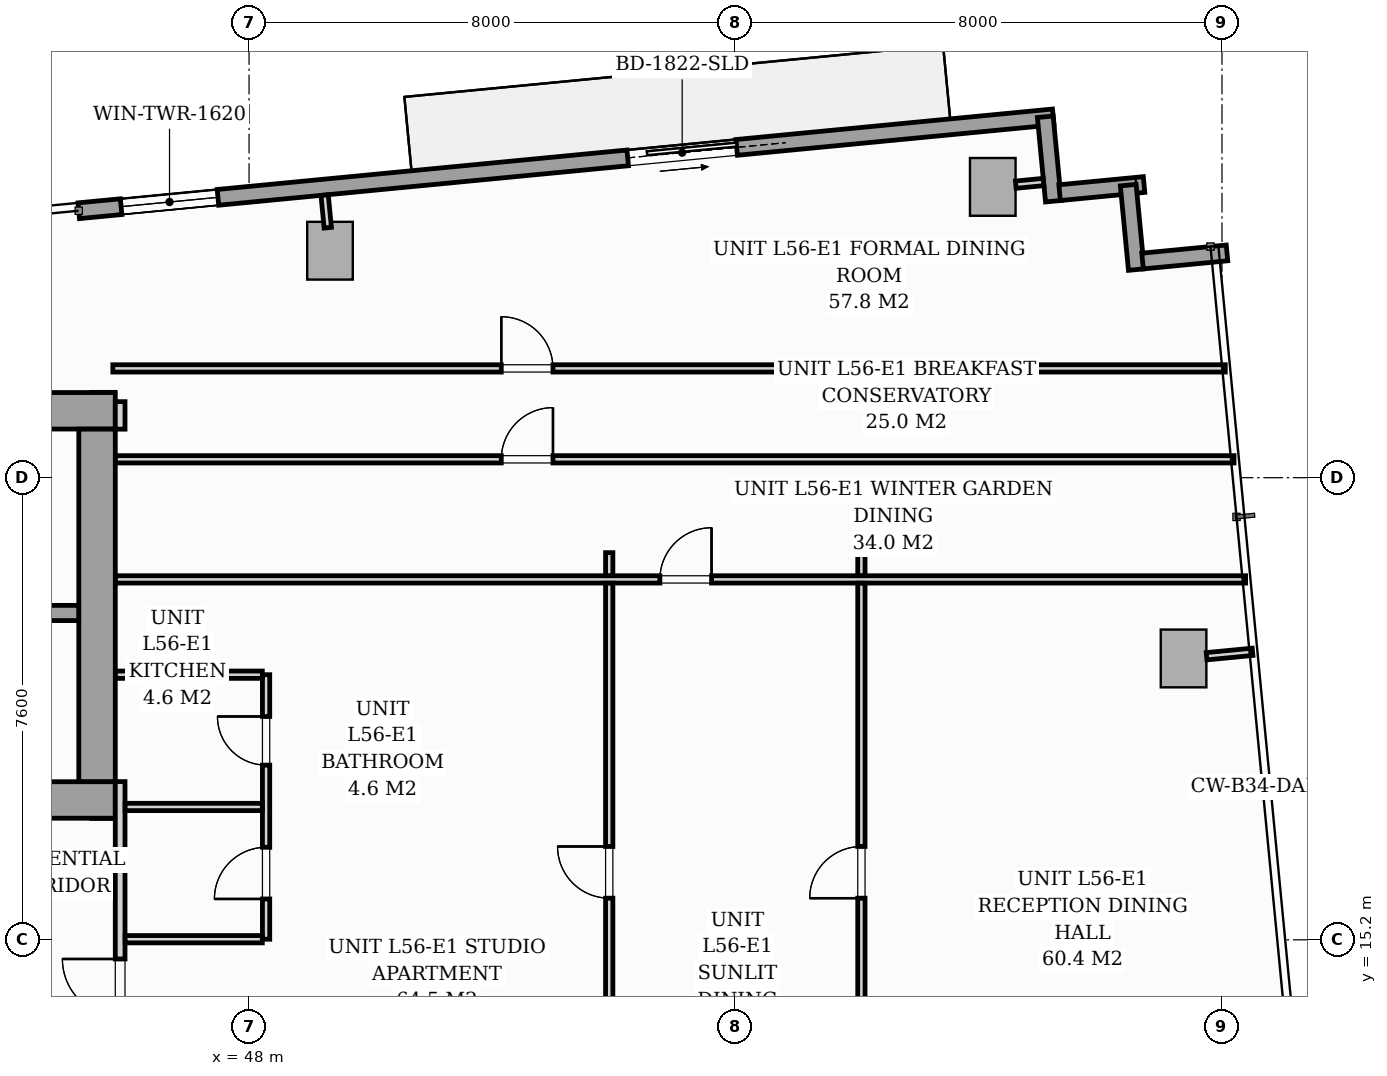
"""IFC4 building model, lengths in metres.
Left out: names, types, materials, properties, quantities, classifications, styles, units other than length and angle.
Written with IfcOpenShell. Run it as: python <this file> out.ifc"""

import sys

from ifc_helpers import new_model, si_unit, direction, frame, frame_2d, origin, origin_2d, place, context, subcontext, project, spatial, rectangle, i_section, extrude, source, transform, mapped, element, fill, save


model = new_model("IFC4")
c1 = context("Model", 3, precision=1e-05, world=origin(), true_north=direction((0.0, 1.0)))
c2 = subcontext(c1, "Body", "Model", "MODEL_VIEW")
j1 = project(units=[si_unit("LENGTHUNIT", "METRE"), si_unit("PLANEANGLEUNIT", "RADIAN")], contexts=[c1])
p1 = place(None, origin())
s1 = spatial("IfcSite", under=j1, at=p1, CompositionType="ELEMENT")
p2 = place(p1, origin())
s2 = spatial("IfcBuilding", under=s1, at=p2, CompositionType="ELEMENT")
p3 = place(p2, frame((0.0, 0.0, 195.4)))
s3 = spatial("IfcBuildingStorey", under=s2, at=p3, CompositionType="ELEMENT", Elevation=195.4)
m1 = source(origin(), c2, "Body", "SweptSolid", [
    extrude(i_section(OverallWidth=0.416, OverallDepth=0.446, WebThickness=0.039, FlangeThickness=0.063, FilletRadius=0.018, at=origin_2d()), origin(), (0.0, 0.0, 1.0), 3.196),
])
for number, where, z_axis, x_axis in (
    (1, (45.6, 17.4, 0.002), (0.0, 0.0, 1.0), (1.0, 0.0, 0.0)),
    (2, (45.6, 24.0, 0.002), (0.0, 0.0, 1.0), (1.0, 0.0, 0.0)),
):
    element("IfcColumn", number, at=place(p3, frame(where, z_axis=z_axis, x_axis=x_axis)), inside=s3, PredefinedType="PILASTER", context=c2, shape_type="MappedRepresentation", body=[
        mapped(m1, transform((0.0, 0.0, 0.0), scale=1.0)),
    ])
m2 = source(origin(), c2, "Body", "SweptSolid", [
    extrude(rectangle(XDim=0.75, YDim=0.95, at=origin_2d()), origin(), (0.0, 0.0, 1.0), 3.196),
])
for number, where, z_axis, x_axis in (
    (3, (49.331, 26.533, 0.002), (0.0, 0.0, 1.0), (0.995, 0.096, 0.0)),
    (4, (60.23, 27.582, 0.002), (0.0, 0.0, 1.0), (0.995, 0.096, 0.0)),
    (5, (63.368, 19.827, 0.002), (0.0, 0.0, 1.0), (0.995, 0.096, 0.0)),
):
    element("IfcColumn", number, at=place(p3, frame(where, z_axis=z_axis, x_axis=x_axis)), inside=s3, PredefinedType="COLUMN", context=c2, shape_type="MappedRepresentation", body=[
        mapped(m2, transform((0.0, 0.0, 0.0), scale=1.0)),
    ])
p4 = place(p3, frame((45.199, 27.19, 0.0), z_axis=(0.0, 0.0, 1.0), x_axis=(0.995397074604, 0.095836652014, 0.0)))
e6 = element("IfcWall", 6, at=p4, inside=s3, PredefinedType="STANDARD", context=c2, shape_type="SweptSolid", body=[
    extrude(rectangle(XDim=16.1, YDim=0.26, at=frame_2d((8.05, 0.0))), origin(), (0.0, 0.0, 1.0), 2.94),
])
p5 = place(p4, frame((9.07, 0.0, 0.0)))
e7 = element("IfcOpeningElement", 7, at=p5, cuts=e6, PredefinedType="OPENING", context=c2, shape_type="SweptSolid", body=[
    extrude(rectangle(XDim=1.8, YDim=2.06, at=frame_2d((0.9, 1.03))), frame((0.0, 0.14, 0.0), z_axis=(0.0, -1.0, 0.0), x_axis=(1.0, 0.0, 0.0)), (0.0, 0.0, 1.0), 0.28),
])
p6 = place(p4, frame((0.7, 0.0, 0.65)))
e8 = element("IfcOpeningElement", 8, at=p6, cuts=e6, PredefinedType="OPENING", context=c2, shape_type="SweptSolid", body=[
    extrude(rectangle(XDim=1.6, YDim=1.5, at=frame_2d((0.8, 0.75))), frame((0.0, 0.14, 0.0), z_axis=(0.0, -1.0, 0.0), x_axis=(1.0, 0.0, 0.0)), (0.0, 0.0, 1.0), 0.28),
])
p7 = place(p3, frame((61.094, 28.735, 0.0), z_axis=(0.0, 0.0, 1.0), x_axis=(0.095742423056, -0.99540614245, 0.0)))
e9 = element("IfcWall", 9, at=p7, inside=s3, PredefinedType="STANDARD", context=c2, shape_type="SweptSolid", body=[
    extrude(rectangle(XDim=1.395, YDim=0.26, at=frame_2d((0.697, 0.0))), origin(), (0.0, 0.0, 1.0), 2.94),
])
p8 = place(p3, frame((61.33, 27.487, 0.0), z_axis=(0.0, 0.0, 1.0), x_axis=(0.995391056452, 0.09589913835, 0.0)))
e10 = element("IfcWall", 10, at=p8, inside=s3, PredefinedType="STANDARD", context=c2, shape_type="SweptSolid", body=[
    extrude(rectangle(XDim=1.395, YDim=0.26, at=frame_2d((0.698, 0.0))), origin(), (0.0, 0.0, 1.0), 2.94),
])
for number, where, z_axis, x_axis in (
    (11, (62.458, 27.611, 0.0), (0.0, 0.0, 1.0), (0.096, -0.995, 0.0)),
    (12, (62.694, 26.363, 0.0), (0.0, 0.0, 1.0), (0.995, 0.096, 0.0)),
):
    element("IfcWall", number, at=place(p3, frame(where, z_axis=z_axis, x_axis=x_axis)), inside=s3, PredefinedType="STANDARD", context=c2, shape_type="SweptSolid", body=[
        extrude(rectangle(XDim=1.395, YDim=0.26, at=frame_2d((0.697, 0.0))), origin(), (0.0, 0.0, 1.0), 2.94),
    ])
p9 = place(p3, frame((26.2, 17.5, 0.0), z_axis=(0.0, 0.0, 1.0), x_axis=(1.0, 0.0, 0.0)))
e13 = element("IfcWall", 13, at=p9, inside=s3, PredefinedType="SHEAR", context=c2, shape_type="SweptSolid", body=[
    extrude(rectangle(XDim=19.6, YDim=0.6, at=frame_2d((9.8, 0.0))), origin(), (0.0, 0.0, 1.0), 3.2),
])
p10 = place(p9, frame((0.95, 0.0, 0.0)))
e14 = element("IfcOpeningElement", 14, at=p10, cuts=e13, PredefinedType="OPENING", context=c2, shape_type="SweptSolid", body=[
    extrude(rectangle(XDim=0.95, YDim=2.06, at=frame_2d((0.475, 1.03))), frame((0.0, 0.31, 0.0), z_axis=(0.0, -1.0, 0.0), x_axis=(1.0, 0.0, 0.0)), (0.0, 0.0, 1.0), 0.62),
])
p11 = place(p9, frame((9.38, 0.0, 0.0)))
e15 = element("IfcOpeningElement", 15, at=p11, cuts=e13, PredefinedType="OPENING", context=c2, shape_type="SweptSolid", body=[
    extrude(rectangle(XDim=0.85, YDim=2.0, at=frame_2d((0.425, 1.0))), frame((0.0, 0.31, 0.0), z_axis=(0.0, -1.0, 0.0), x_axis=(1.0, 0.0, 0.0)), (0.0, 0.0, 1.0), 0.62),
])
p12 = place(p9, frame((17.55, 0.0, 0.0)))
e16 = element("IfcOpeningElement", 16, at=p12, cuts=e13, PredefinedType="OPENING", context=c2, shape_type="SweptSolid", body=[
    extrude(rectangle(XDim=0.95, YDim=2.06, at=frame_2d((0.475, 1.03))), frame((0.0, 0.31, 0.0), z_axis=(0.0, -1.0, 0.0), x_axis=(1.0, 0.0, 0.0)), (0.0, 0.0, 1.0), 0.62),
])
p13 = place(p3, frame((26.2, 23.9, 0.0), z_axis=(0.0, 0.0, 1.0), x_axis=(1.0, 0.0, 0.0)))
e17 = element("IfcWall", 17, at=p13, inside=s3, PredefinedType="SHEAR", context=c2, shape_type="SweptSolid", body=[
    extrude(rectangle(XDim=19.6, YDim=0.6, at=frame_2d((9.8, 0.0))), origin(), (0.0, 0.0, 1.0), 3.2),
])
p14 = place(p3, frame((45.5, 17.802, 0.0), z_axis=(0.0, 0.0, 1.0), x_axis=(0.0, 1.0, 0.0)))
e18 = element("IfcWall", 18, at=p14, inside=s3, PredefinedType="SHEAR", context=c2, shape_type="SweptSolid", body=[
    extrude(rectangle(XDim=5.796, YDim=0.6, at=frame_2d((2.898, 0.0))), origin(), (0.0, 0.0, 1.0), 3.2),
])
p15 = place(p3, frame((37.05, 20.575, 0.0), z_axis=(0.0, 0.0, 1.0), x_axis=(1.0, 0.0, 0.0)))
e19 = element("IfcWall", 19, at=p15, inside=s3, PredefinedType="SOLIDWALL", context=c2, shape_type="SweptSolid", body=[
    extrude(rectangle(XDim=8.148, YDim=0.25, at=frame_2d((4.074, 0.0))), origin(), (0.0, 0.0, 1.0), 3.2),
])
p16 = place(p15, frame((6.6, 0.0, 0.0)))
e20 = element("IfcOpeningElement", 20, at=p16, cuts=e19, PredefinedType="OPENING", context=c2, shape_type="SweptSolid", body=[
    extrude(rectangle(XDim=0.95, YDim=2.06, at=frame_2d((0.475, 1.03))), frame((0.0, 0.135, 0.0), z_axis=(0.0, -1.0, 0.0), x_axis=(1.0, 0.0, 0.0)), (0.0, 0.0, 1.0), 0.27),
])
p17 = place(p3, frame((45.88, 13.442, 0.0), z_axis=(0.0, 0.0, 1.0), x_axis=(0.0, 1.0, 0.0)))
e21 = element("IfcWall", 21, at=p17, inside=s3, PredefinedType="PARTITIONING", context=c2, shape_type="SweptSolid", body=[
    extrude(rectangle(XDim=4.36, YDim=0.16, at=frame_2d((2.18, 0.0))), origin(), (0.0, 0.0, 1.0), 2.94),
])
p18 = place(p17, frame((0.493, 0.0, 0.0)))
e22 = element("IfcOpeningElement", 22, at=p18, cuts=e21, PredefinedType="OPENING", context=c2, shape_type="SweptSolid", body=[
    extrude(rectangle(XDim=0.95, YDim=2.06, at=frame_2d((0.475, 1.03))), frame((0.0, 0.09, 0.0), z_axis=(0.0, -1.0, 0.0), x_axis=(1.0, 0.0, 0.0)), (0.0, 0.0, 1.0), 0.18),
])
p19 = place(p3, frame((45.88, 23.598, 0.0), z_axis=(0.0, 0.0, 1.0), x_axis=(0.0, 1.0, 0.0)))
e23 = element("IfcWall", 23, at=p19, inside=s3, PredefinedType="PARTITIONING", context=c2, shape_type="SweptSolid", body=[
    extrude(rectangle(XDim=0.452, YDim=0.16, at=frame_2d((0.226, 0.0))), origin(), (0.0, 0.0, 1.0), 2.94),
])
p20 = place(p3, frame((48.28, 15.21, 0.0), z_axis=(0.0, 0.0, 1.0), x_axis=(0.0, 1.0, 0.0)))
e24 = element("IfcWall", 24, at=p20, inside=s3, PredefinedType="PARTITIONING", context=c2, shape_type="SweptSolid", body=[
    extrude(rectangle(XDim=4.35, YDim=0.12, at=frame_2d((2.175, 0.0))), origin(), (0.0, 0.0, 1.0), 2.94),
])
p21 = place(p20, frame((0.662, 0.0, 0.0)))
e25 = element("IfcOpeningElement", 25, at=p21, cuts=e24, PredefinedType="OPENING", context=c2, shape_type="SweptSolid", body=[
    extrude(rectangle(XDim=0.85, YDim=2.05, at=frame_2d((0.425, 1.025))), frame((0.0, 0.07, 0.0), z_axis=(0.0, -1.0, 0.0), x_axis=(1.0, 0.0, 0.0)), (0.0, 0.0, 1.0), 0.14),
])
p22 = place(p20, frame((2.863, 0.0, 0.0)))
e26 = element("IfcOpeningElement", 26, at=p22, cuts=e24, PredefinedType="OPENING", context=c2, shape_type="SweptSolid", body=[
    extrude(rectangle(XDim=0.8, YDim=2.02, at=frame_2d((0.4, 1.01))), frame((0.0, 0.07, 0.0), z_axis=(0.0, -1.0, 0.0), x_axis=(1.0, 0.0, 0.0)), (0.0, 0.0, 1.0), 0.14),
])
p23 = place(p3, frame((45.962, 17.385, 0.0), z_axis=(0.0, 0.0, 1.0), x_axis=(1.0, 0.0, 0.0)))
e27 = element("IfcWall", 27, at=p23, inside=s3, PredefinedType="PARTITIONING", context=c2, shape_type="SweptSolid", body=[
    extrude(rectangle(XDim=2.256, YDim=0.12, at=frame_2d((1.128, 0.0))), origin(), (0.0, 0.0, 1.0), 2.281),
])
p24 = place(p3, frame((45.962, 15.21, 0.0), z_axis=(0.0, 0.0, 1.0), x_axis=(1.0, 0.0, 0.0)))
e28 = element("IfcWall", 28, at=p24, inside=s3, PredefinedType="PARTITIONING", context=c2, shape_type="SweptSolid", body=[
    extrude(rectangle(XDim=2.256, YDim=0.12, at=frame_2d((1.128, 0.0))), origin(), (0.0, 0.0, 1.0), 2.94),
])
p25 = place(p3, frame((45.802, 19.56, 0.0), z_axis=(0.0, 0.0, 1.0), x_axis=(1.0, 0.0, 0.0)))
e29 = element("IfcWall", 29, at=p25, inside=s3, PredefinedType="PARTITIONING", context=c2, shape_type="SweptSolid", body=[
    extrude(rectangle(XDim=2.416, YDim=0.12, at=frame_2d((1.208, 0.0))), origin(), (0.0, 0.0, 1.0), 2.94),
])
p26 = place(p3, frame((45.76, 24.597, 0.0), z_axis=(0.0, 0.0, 1.0), x_axis=(1.0, 0.0, 0.0)))
e30 = element("IfcWall", 30, at=p26, inside=s3, PredefinedType="PARTITIONING", context=c2, shape_type="SweptSolid", body=[
    extrude(rectangle(XDim=18.294, YDim=0.12, at=frame_2d((9.147, 0.0))), origin(), (0.0, 0.0, 1.0), 2.94),
])
p27 = place(p26, frame((6.388, 0.0, 0.0)))
e31 = element("IfcOpeningElement", 31, at=p27, cuts=e30, PredefinedType="OPENING", context=c2, shape_type="SweptSolid", body=[
    extrude(rectangle(XDim=0.85, YDim=2.05, at=frame_2d((0.425, 1.025))), frame((0.0, 0.07, 0.0), z_axis=(0.0, -1.0, 0.0), x_axis=(1.0, 0.0, 0.0)), (0.0, 0.0, 1.0), 0.14),
])
p28 = place(p3, frame((45.802, 23.102, 0.0), z_axis=(0.0, 0.0, 1.0), x_axis=(1.0, 0.0, 0.0)))
e32 = element("IfcWall", 32, at=p28, inside=s3, PredefinedType="PARTITIONING", context=c2, shape_type="SweptSolid", body=[
    extrude(rectangle(XDim=18.396, YDim=0.12, at=frame_2d((9.198, 0.0))), origin(), (0.0, 0.0, 1.0), 2.94),
])
p29 = place(p28, frame((6.346, 0.0, 0.0)))
e33 = element("IfcOpeningElement", 33, at=p29, cuts=e32, PredefinedType="OPENING", context=c2, shape_type="SweptSolid", body=[
    extrude(rectangle(XDim=0.85, YDim=2.05, at=frame_2d((0.425, 1.025))), frame((0.0, 0.07, 0.0), z_axis=(0.0, -1.0, 0.0), x_axis=(1.0, 0.0, 0.0)), (0.0, 0.0, 1.0), 0.14),
])
p30 = place(p3, frame((45.802, 21.127, 0.0), z_axis=(0.0, 0.0, 1.0), x_axis=(1.0, 0.0, 0.0)))
e34 = element("IfcWall", 34, at=p30, inside=s3, PredefinedType="PARTITIONING", context=c2, shape_type="SweptSolid", body=[
    extrude(rectangle(XDim=18.586, YDim=0.12, at=frame_2d((9.293, 0.0))), origin(), (0.0, 0.0, 1.0), 2.94),
])
p31 = place(p30, frame((8.954, 0.0, 0.0)))
e35 = element("IfcOpeningElement", 35, at=p31, cuts=e34, PredefinedType="OPENING", context=c2, shape_type="SweptSolid", body=[
    extrude(rectangle(XDim=0.85, YDim=2.05, at=frame_2d((0.425, 1.025))), frame((0.0, 0.07, 0.0), z_axis=(0.0, -1.0, 0.0), x_axis=(1.0, 0.0, 0.0)), (0.0, 0.0, 1.0), 0.14),
])
p32 = place(p3, frame((58.07, 11.556, 0.0), z_axis=(0.0, 0.0, 1.0), x_axis=(0.0, 1.0, 0.0)))
e36 = element("IfcWall", 36, at=p32, inside=s3, PredefinedType="PARTITIONING", context=c2, shape_type="SweptSolid", body=[
    extrude(rectangle(XDim=9.509, YDim=0.12, at=frame_2d((4.754, 0.0))), origin(), (0.0, 0.0, 1.0), 2.94),
])
p33 = place(p32, frame((4.329, 0.0, 0.0)))
e37 = element("IfcOpeningElement", 37, at=p33, cuts=e36, PredefinedType="OPENING", context=c2, shape_type="SweptSolid", body=[
    extrude(rectangle(XDim=0.85, YDim=2.05, at=frame_2d((0.425, 1.025))), frame((0.0, 0.07, 0.0), z_axis=(0.0, -1.0, 0.0), x_axis=(1.0, 0.0, 0.0)), (0.0, 0.0, 1.0), 0.14),
])
p34 = place(p3, frame((58.07, 21.189, 0.0), z_axis=(0.0, 0.0, 1.0), x_axis=(0.0, 1.0, 0.0)))
e38 = element("IfcWall", 38, at=p34, inside=s3, PredefinedType="PARTITIONING", context=c2, shape_type="SweptSolid", body=[
    extrude(rectangle(XDim=0.378, YDim=0.12, at=frame_2d((0.189, 0.0))), origin(), (0.0, 0.0, 1.0), 2.94),
])
p35 = place(p3, frame((53.923, 11.556, 0.0), z_axis=(0.0, 0.0, 1.0), x_axis=(0.0, 1.0, 0.0)))
e39 = element("IfcWall", 39, at=p35, inside=s3, PredefinedType="PARTITIONING", context=c2, shape_type="SweptSolid", body=[
    extrude(rectangle(XDim=9.509, YDim=0.12, at=frame_2d((4.754, 0.0))), origin(), (0.0, 0.0, 1.0), 2.94),
])
p36 = place(p35, frame((4.329, 0.0, 0.0)))
e40 = element("IfcOpeningElement", 40, at=p36, cuts=e39, PredefinedType="OPENING", context=c2, shape_type="SweptSolid", body=[
    extrude(rectangle(XDim=0.85, YDim=2.05, at=frame_2d((0.425, 1.025))), frame((0.0, 0.07, 0.0), z_axis=(0.0, -1.0, 0.0), x_axis=(1.0, 0.0, 0.0)), (0.0, 0.0, 1.0), 0.14),
])
p37 = place(p3, frame((53.923, 21.189, 0.0), z_axis=(0.0, 0.0, 1.0), x_axis=(0.0, 1.0, 0.0)))
e41 = element("IfcWall", 41, at=p37, inside=s3, PredefinedType="PARTITIONING", context=c2, shape_type="SweptSolid", body=[
    extrude(rectangle(XDim=0.378, YDim=0.12, at=frame_2d((0.189, 0.0))), origin(), (0.0, 0.0, 1.0), 2.94),
])
p38 = place(p3, frame((49.294, 26.911, 0.0), z_axis=(0.0, 0.0, 1.0), x_axis=(-0.095772948675, 0.995403205893, 0.0)))
e42 = element("IfcWall", 42, at=p38, inside=s3, PredefinedType="PARTITIONING", context=c2, shape_type="SweptSolid", body=[
    extrude(rectangle(XDim=0.538, YDim=0.12, at=frame_2d((0.269, 0.0))), origin(), (0.0, 0.0, 1.0), 2.94),
])
p39 = place(p3, frame((60.609, 27.618, 0.0), z_axis=(0.0, 0.0, 1.0), x_axis=(0.995384576284, 0.09596637586, 0.0)))
e43 = element("IfcWall", 43, at=p39, inside=s3, PredefinedType="PARTITIONING", context=c2, shape_type="SweptSolid", body=[
    extrude(rectangle(XDim=0.458, YDim=0.12, at=frame_2d((0.229, 0.0))), origin(), (0.0, 0.0, 1.0), 2.94),
])
p40 = place(p3, frame((63.747, 19.864, 0.0), z_axis=(0.0, 0.0, 1.0), x_axis=(0.995405496295, 0.095749140702, 0.0)))
e44 = element("IfcWall", 44, at=p40, inside=s3, PredefinedType="PARTITIONING", context=c2, shape_type="SweptSolid", body=[
    extrude(rectangle(XDim=0.76, YDim=0.12, at=frame_2d((0.38, 0.0))), origin(), (0.0, 0.0, 1.0), 2.94),
])
m3 = source(origin(), c2, "Body", "SweptSolid", [
    extrude(rectangle(XDim=1.8, YDim=2.06, at=frame_2d((0.9, 1.03))), frame((0.0, 0.025, 0.0), z_axis=(0.0, -1.0, 0.0), x_axis=(1.0, 0.0, 0.0)), (0.0, 0.0, 1.0), 0.05),
])
p41 = place(p5, origin())
e45 = element("IfcDoor", 45, at=p41, inside=s3, OperationType="SLIDING_TO_RIGHT", PredefinedType="DOOR", context=c2, shape_type="MappedRepresentation", body=[
    mapped(m3, transform((0.0, 0.0, 0.0), scale=1.0)),
])
fill(e7, e45)
m4 = source(origin(), c2, "Body", "SweptSolid", [
    extrude(rectangle(XDim=1.6, YDim=1.5, at=frame_2d((0.8, 0.75))), frame((0.0, 0.03, 0.0), z_axis=(0.0, -1.0, 0.0), x_axis=(1.0, 0.0, 0.0)), (0.0, 0.0, 1.0), 0.06),
])
p42 = place(p6, origin())
e46 = element("IfcWindow", 46, at=p42, inside=s3, PartitioningType="SINGLE_PANEL", PredefinedType="WINDOW", context=c2, shape_type="MappedRepresentation", body=[
    mapped(m4, transform((0.0, 0.0, 0.0), scale=1.0)),
])
fill(e8, e46)
m5 = source(origin(), c2, "Body", "SweptSolid", [
    extrude(rectangle(XDim=0.95, YDim=2.06, at=frame_2d((0.475, 1.03))), frame((0.0, 0.025, 0.0), z_axis=(0.0, -1.0, 0.0), x_axis=(1.0, 0.0, 0.0)), (0.0, 0.0, 1.0), 0.05),
])
p43 = place(p18, origin())
e47 = element("IfcDoor", 47, at=p43, inside=s3, OperationType="SINGLE_SWING_RIGHT", PredefinedType="DOOR", context=c2, shape_type="MappedRepresentation", body=[
    mapped(m5, transform((0.0, 0.0, 0.0), scale=1.0)),
])
fill(e22, e47)
m6 = source(origin(), c2, "Body", "SweptSolid", [
    extrude(rectangle(XDim=0.85, YDim=2.05, at=frame_2d((0.425, 1.025))), frame((0.0, 0.025, 0.0), z_axis=(0.0, -1.0, 0.0), x_axis=(1.0, 0.0, 0.0)), (0.0, 0.0, 1.0), 0.05),
])
p44 = place(p21, origin())
e48 = element("IfcDoor", 48, at=p44, inside=s3, OperationType="SINGLE_SWING_LEFT", PredefinedType="DOOR", context=c2, shape_type="MappedRepresentation", body=[
    mapped(m6, transform((0.0, 0.0, 0.0), scale=1.0)),
])
fill(e25, e48)
m7 = source(origin(), c2, "Body", "SweptSolid", [
    extrude(rectangle(XDim=0.8, YDim=2.02, at=frame_2d((0.4, 1.01))), frame((0.0, 0.025, 0.0), z_axis=(0.0, -1.0, 0.0), x_axis=(1.0, 0.0, 0.0)), (0.0, 0.0, 1.0), 0.05),
])
p45 = place(p22, origin())
e49 = element("IfcDoor", 49, at=p45, inside=s3, OperationType="SINGLE_SWING_RIGHT", PredefinedType="DOOR", context=c2, shape_type="MappedRepresentation", body=[
    mapped(m7, transform((0.0, 0.0, 0.0), scale=1.0)),
])
fill(e26, e49)
p46 = place(p27, origin())
e50 = element("IfcDoor", 50, at=p46, inside=s3, OperationType="SINGLE_SWING_LEFT", PredefinedType="DOOR", context=c2, shape_type="MappedRepresentation", body=[
    mapped(m6, transform((0.0, 0.0, 0.0), scale=1.0)),
])
fill(e31, e50)
p47 = place(p29, origin())
e51 = element("IfcDoor", 51, at=p47, inside=s3, OperationType="SINGLE_SWING_RIGHT", PredefinedType="DOOR", context=c2, shape_type="MappedRepresentation", body=[
    mapped(m6, transform((0.0, 0.0, 0.0), scale=1.0)),
])
fill(e33, e51)
p48 = place(p31, origin())
e52 = element("IfcDoor", 52, at=p48, inside=s3, OperationType="SINGLE_SWING_RIGHT", PredefinedType="DOOR", context=c2, shape_type="MappedRepresentation", body=[
    mapped(m6, transform((0.0, 0.0, 0.0), scale=1.0)),
])
fill(e35, e52)
p49 = place(p33, origin())
e53 = element("IfcDoor", 53, at=p49, inside=s3, OperationType="SINGLE_SWING_LEFT", PredefinedType="DOOR", context=c2, shape_type="MappedRepresentation", body=[
    mapped(m6, transform((0.0, 0.0, 0.0), scale=1.0)),
])
fill(e37, e53)
p50 = place(p36, origin())
e54 = element("IfcDoor", 54, at=p50, inside=s3, OperationType="SINGLE_SWING_RIGHT", PredefinedType="DOOR", context=c2, shape_type="MappedRepresentation", body=[
    mapped(m6, transform((0.0, 0.0, 0.0), scale=1.0)),
])
fill(e40, e54)
save(model, sys.argv[1])
